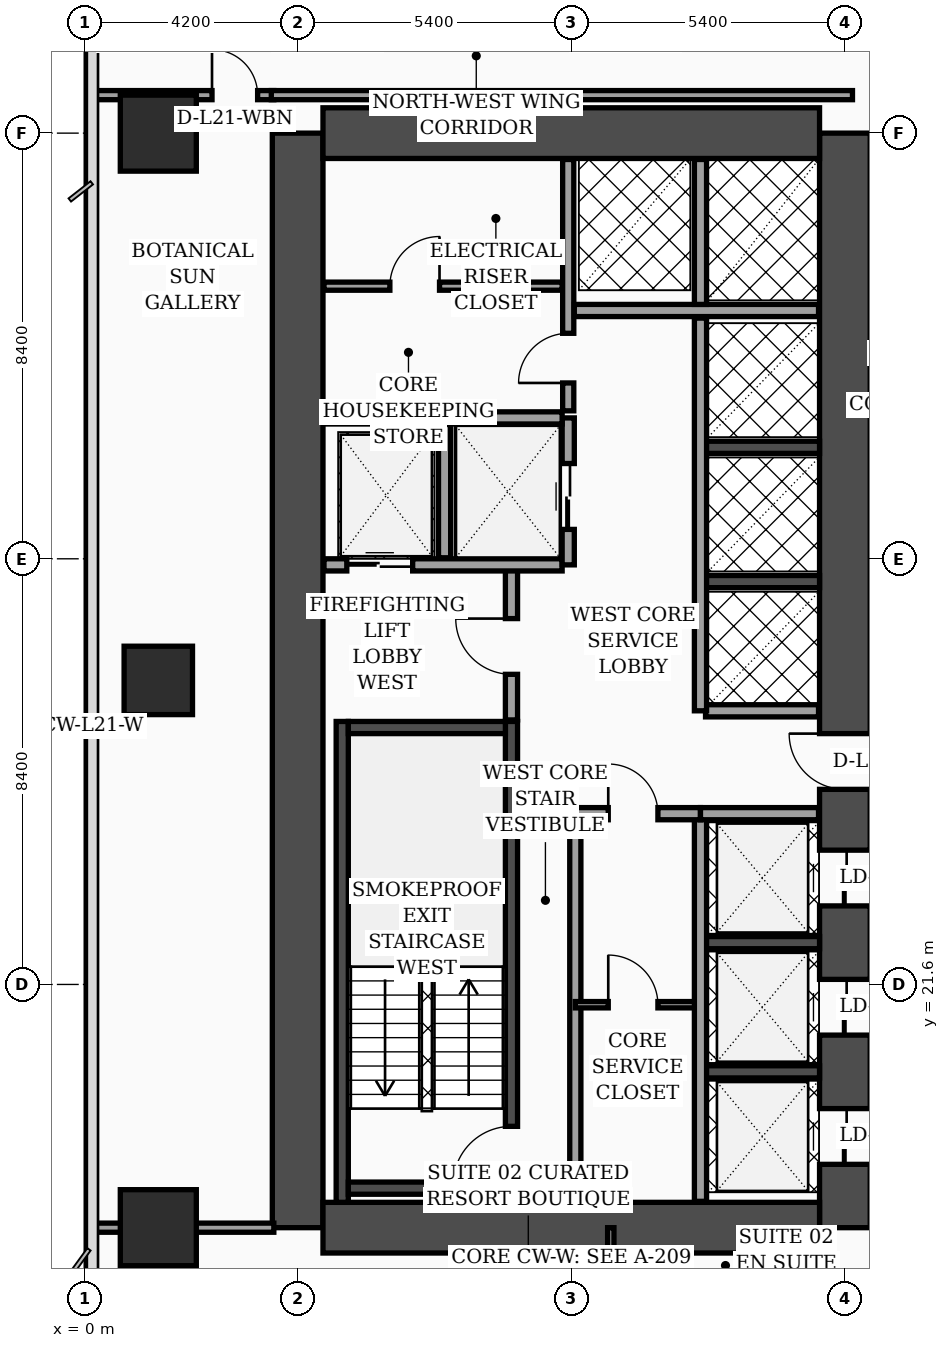
"""IFC4 building model, lengths in metres.
Left out: names, types, materials, properties, quantities, classifications, styles, units other than length and angle.
Written with IfcOpenShell. Run it as: python <this file> out.ifc"""

import sys

from ifc_helpers import new_model, si_unit, direction, frame, frame_2d, origin, origin_2d, place, context, subcontext, project, spatial, rectangle, extrude, element, fill, save


model = new_model("IFC4")
c1 = context("Model", 3, precision=1e-05, world=origin(), true_north=direction((0.0, 1.0)))
c2 = subcontext(c1, "Body", "Model", "MODEL_VIEW")
j1 = project(units=[si_unit("LENGTHUNIT", "METRE"), si_unit("PLANEANGLEUNIT", "RADIAN")], contexts=[c1])
p1 = place(None, origin())
s1 = spatial("IfcSite", under=j1, at=p1, CompositionType="ELEMENT")
p2 = place(p1, origin())
s2 = spatial("IfcBuilding", under=s1, at=p2, CompositionType="ELEMENT")
p3 = place(p2, frame((0.0, 0.0, 88.8)))
s3 = spatial("IfcBuildingStorey", under=s2, at=p3, CompositionType="ELEMENT", Elevation=88.8)
p4 = place(p3, frame((4.2, 16.8, 0.0), z_axis=(0.0, 0.0, 1.0), x_axis=(0.0, 1.0, 0.0)))
e1 = element("IfcWall", 1, at=p4, inside=s3, PredefinedType="SHEAR", context=c2, shape_type="SweptSolid", body=[
    extrude(rectangle(XDim=21.6, YDim=1.0, at=frame_2d((10.8, 0.0))), origin(), (0.0, 0.0, 1.0), 3.52),
])
p5 = place(p3, frame((15.0, 16.8, 0.0), z_axis=(0.0, 0.0, 1.0), x_axis=(0.0, 1.0, 0.0)))
e2 = element("IfcWall", 2, at=p5, inside=s3, PredefinedType="SHEAR", context=c2, shape_type="SweptSolid", body=[
    extrude(rectangle(XDim=21.6, YDim=1.0, at=frame_2d((10.8, 0.0))), origin(), (0.0, 0.0, 1.0), 3.52),
])
p6 = place(p5, frame((8.65, 0.0, 0.0)))
e3 = element("IfcOpeningElement", 3, at=p6, cuts=e2, PredefinedType="OPENING", context=c2, shape_type="SweptSolid", body=[
    extrude(rectangle(XDim=1.1, YDim=2.2, at=frame_2d((0.55, 1.1))), frame((0.0, 0.51, 0.0), z_axis=(0.0, -1.0, 0.0), x_axis=(1.0, 0.0, 0.0)), (0.0, 0.0, 1.0), 1.02),
])
p7 = place(p5, frame((1.25, 0.0, 0.0)))
e4 = element("IfcOpeningElement", 4, at=p7, cuts=e2, PredefinedType="OPENING", context=c2, shape_type="SweptSolid", body=[
    extrude(rectangle(XDim=1.1, YDim=2.2, at=frame_2d((0.55, 1.1))), frame((0.0, 0.51, 0.0), z_axis=(0.0, -1.0, 0.0), x_axis=(1.0, 0.0, 0.0)), (0.0, 0.0, 1.0), 1.02),
])
p8 = place(p5, frame((3.8, 0.0, 0.0)))
e5 = element("IfcOpeningElement", 5, at=p8, cuts=e2, PredefinedType="OPENING", context=c2, shape_type="SweptSolid", body=[
    extrude(rectangle(XDim=1.1, YDim=2.2, at=frame_2d((0.55, 1.1))), frame((0.0, 0.51, 0.0), z_axis=(0.0, -1.0, 0.0), x_axis=(1.0, 0.0, 0.0)), (0.0, 0.0, 1.0), 1.02),
])
p9 = place(p5, frame((6.35, 0.0, 0.0)))
e6 = element("IfcOpeningElement", 6, at=p9, cuts=e2, PredefinedType="OPENING", context=c2, shape_type="SweptSolid", body=[
    extrude(rectangle(XDim=1.1, YDim=2.2, at=frame_2d((0.55, 1.1))), frame((0.0, 0.51, 0.0), z_axis=(0.0, -1.0, 0.0), x_axis=(1.0, 0.0, 0.0)), (0.0, 0.0, 1.0), 1.02),
])
for number, where, z_axis, x_axis in (
    (7, (4.7, 38.4, 0.0), (0.0, 0.0, 1.0), (1.0, 0.0, 0.0)),
    (8, (4.7, 16.8, 0.0), (0.0, 0.0, 1.0), (1.0, 0.0, 0.0)),
):
    element("IfcWall", number, at=place(p3, frame(where, z_axis=z_axis, x_axis=x_axis)), inside=s3, PredefinedType="SHEAR", context=c2, shape_type="SweptSolid", body=[
        extrude(rectangle(XDim=9.8, YDim=1.0, at=frame_2d((4.9, 0.0))), origin(), (0.0, 0.0, 1.0), 3.52),
    ])
p10 = place(p3, frame((5.08, 17.3, 0.0), z_axis=(0.0, 0.0, 1.0), x_axis=(0.0, 1.0, 0.0)))
e9 = element("IfcWall", 9, at=p10, inside=s3, PredefinedType="SOLIDWALL", context=c2, shape_type="SweptSolid", body=[
    extrude(rectangle(XDim=9.49, YDim=0.24, at=frame_2d((4.745, 0.0))), origin(), (0.0, 0.0, 1.0), 3.52),
])
p11 = place(p3, frame((8.42, 17.3, 0.0), z_axis=(0.0, 0.0, 1.0), x_axis=(0.0, 1.0, 0.0)))
e10 = element("IfcWall", 10, at=p11, inside=s3, PredefinedType="SOLIDWALL", context=c2, shape_type="SweptSolid", body=[
    extrude(rectangle(XDim=9.49, YDim=0.24, at=frame_2d((4.745, 0.0))), origin(), (0.0, 0.0, 1.0), 3.52),
])
p12 = place(p11, frame((0.35, 0.0, 0.0)))
e11 = element("IfcOpeningElement", 11, at=p12, cuts=e10, PredefinedType="OPENING", context=c2, shape_type="SweptSolid", body=[
    extrude(rectangle(XDim=1.15, YDim=2.2, at=frame_2d((0.575, 1.1))), frame((0.0, 0.13, 0.0), z_axis=(0.0, -1.0, 0.0), x_axis=(1.0, 0.0, 0.0)), (0.0, 0.0, 1.0), 0.26),
])
for number, where, z_axis, x_axis in (
    (12, (5.2, 17.58, 0.0), (0.0, 0.0, 1.0), (1.0, 0.0, 0.0)),
    (13, (5.2, 26.67, 0.0), (0.0, 0.0, 1.0), (1.0, 0.0, 0.0)),
):
    element("IfcWall", number, at=place(p3, frame(where, z_axis=z_axis, x_axis=x_axis)), inside=s3, PredefinedType="SOLIDWALL", context=c2, shape_type="SweptSolid", body=[
        extrude(rectangle(XDim=3.1, YDim=0.24, at=frame_2d((1.55, 0.0))), origin(), (0.0, 0.0, 1.0), 3.52),
    ])
for number, where, z_axis, x_axis in (
    (14, (12.18, 19.875, 0.0), (0.0, 0.0, 1.0), (1.0, 0.0, 0.0)),
    (15, (12.18, 22.425, 0.0), (0.0, 0.0, 1.0), (1.0, 0.0, 0.0)),
    (16, (12.18, 29.55, 0.0), (0.0, 0.0, 1.0), (1.0, 0.0, 0.0)),
    (17, (12.18, 32.2, 0.0), (0.0, 0.0, 1.0), (1.0, 0.0, 0.0)),
):
    element("IfcWall", number, at=place(p3, frame(where, z_axis=z_axis, x_axis=x_axis)), inside=s3, PredefinedType="SOLIDWALL", context=c2, shape_type="SweptSolid", body=[
        extrude(rectangle(XDim=2.32, YDim=0.24, at=frame_2d((1.16, 0.0))), origin(), (0.0, 0.0, 1.0), 3.52),
    ])
p13 = place(p3, frame((1.45, 16.8, 0.0), z_axis=(0.0, 0.0, 1.0), x_axis=(1.0, 0.0, 0.0)))
e18 = element("IfcColumn", 18, at=p13, inside=s3, PredefinedType="COLUMN", context=c2, shape_type="SweptSolid", body=[
    extrude(rectangle(XDim=1.5, YDim=1.5, at=origin_2d()), origin(), (0.0, 0.0, 1.0), 3.52),
])
p14 = place(p3, frame((1.45, 27.6, 0.0), z_axis=(0.0, 0.0, 1.0), x_axis=(1.0, 0.0, 0.0)))
e19 = element("IfcColumn", 19, at=p14, inside=s3, PredefinedType="COLUMN", context=c2, shape_type="SweptSolid", body=[
    extrude(rectangle(XDim=1.35, YDim=1.35, at=origin_2d()), origin(), (0.0, 0.0, 1.0), 3.52),
])
p15 = place(p3, frame((1.45, 38.4, 0.0), z_axis=(0.0, 0.0, 1.0), x_axis=(1.0, 0.0, 0.0)))
e20 = element("IfcColumn", 20, at=p15, inside=s3, PredefinedType="COLUMN", context=c2, shape_type="SweptSolid", body=[
    extrude(rectangle(XDim=1.5, YDim=1.5, at=origin_2d()), origin(), (0.0, 0.0, 1.0), 3.52),
])
p16 = place(p3, frame((8.42, 26.82, 0.0), z_axis=(0.0, 0.0, 1.0), x_axis=(0.0, 1.0, 0.0)))
e21 = element("IfcWall", 21, at=p16, inside=s3, PredefinedType="SOLIDWALL", context=c2, shape_type="SweptSolid", body=[
    extrude(rectangle(XDim=3.0, YDim=0.24, at=frame_2d((1.5, 0.0))), origin(), (0.0, 0.0, 1.0), 3.52),
])
p17 = place(p16, frame((0.9, 0.0, 0.0)))
e22 = element("IfcOpeningElement", 22, at=p17, cuts=e21, PredefinedType="OPENING", context=c2, shape_type="SweptSolid", body=[
    extrude(rectangle(XDim=1.1, YDim=2.2, at=frame_2d((0.55, 1.1))), frame((0.0, 0.13, 0.0), z_axis=(0.0, -1.0, 0.0), x_axis=(1.0, 0.0, 0.0)), (0.0, 0.0, 1.0), 0.26),
])
p18 = place(p3, frame((4.72, 29.88, 0.0), z_axis=(0.0, 0.0, 1.0), x_axis=(1.0, 0.0, 0.0)))
e23 = element("IfcWall", 23, at=p18, inside=s3, PredefinedType="SOLIDWALL", context=c2, shape_type="SweptSolid", body=[
    extrude(rectangle(XDim=4.7, YDim=0.24, at=frame_2d((2.35, 0.0))), origin(), (0.0, 0.0, 1.0), 3.52),
])
p19 = place(p18, frame((0.45, 0.0, 0.0)))
e24 = element("IfcOpeningElement", 24, at=p19, cuts=e23, PredefinedType="OPENING", context=c2, shape_type="SweptSolid", body=[
    extrude(rectangle(XDim=1.3, YDim=2.35, at=frame_2d((0.65, 1.175))), frame((0.0, 0.13, 0.0), z_axis=(0.0, -1.0, 0.0), x_axis=(1.0, 0.0, 0.0)), (0.0, 0.0, 1.0), 0.26),
])
p20 = place(p3, frame((7.1, 30.02, 0.0), z_axis=(0.0, 0.0, 1.0), x_axis=(0.0, 1.0, 0.0)))
e25 = element("IfcWall", 25, at=p20, inside=s3, PredefinedType="SOLIDWALL", context=c2, shape_type="SweptSolid", body=[
    extrude(rectangle(XDim=2.63, YDim=0.24, at=frame_2d((1.315, 0.0))), origin(), (0.0, 0.0, 1.0), 3.52),
])
p21 = place(p3, frame((9.54, 29.88, 0.0), z_axis=(0.0, 0.0, 1.0), x_axis=(0.0, 1.0, 0.0)))
e26 = element("IfcWall", 26, at=p21, inside=s3, PredefinedType="SOLIDWALL", context=c2, shape_type="SweptSolid", body=[
    extrude(rectangle(XDim=2.9, YDim=0.24, at=frame_2d((1.45, 0.0))), origin(), (0.0, 0.0, 1.0), 3.52),
])
p22 = place(p21, frame((0.7, 0.0, 0.0)))
e27 = element("IfcOpeningElement", 27, at=p22, cuts=e26, PredefinedType="OPENING", context=c2, shape_type="SweptSolid", body=[
    extrude(rectangle(XDim=1.3, YDim=2.35, at=frame_2d((0.65, 1.175))), frame((0.0, 0.13, 0.0), z_axis=(0.0, -1.0, 0.0), x_axis=(1.0, 0.0, 0.0)), (0.0, 0.0, 1.0), 0.26),
])
p23 = place(p3, frame((4.72, 32.78, 0.0), z_axis=(0.0, 0.0, 1.0), x_axis=(1.0, 0.0, 0.0)))
e28 = element("IfcWall", 28, at=p23, inside=s3, PredefinedType="SOLIDWALL", context=c2, shape_type="SweptSolid", body=[
    extrude(rectangle(XDim=4.7, YDim=0.24, at=frame_2d((2.35, 0.0))), origin(), (0.0, 0.0, 1.0), 3.52),
])
p24 = place(p3, frame((9.68, 17.32, 0.0), z_axis=(0.0, 0.0, 1.0), x_axis=(0.0, 1.0, 0.0)))
e29 = element("IfcWall", 29, at=p24, inside=s3, PredefinedType="SOLIDWALL", context=c2, shape_type="SweptSolid", body=[
    extrude(rectangle(XDim=7.68, YDim=0.22, at=frame_2d((3.84, 0.0))), origin(), (0.0, 0.0, 1.0), 3.52),
])
p25 = place(p3, frame((4.72, 35.38, 0.0), z_axis=(0.0, 0.0, 1.0), x_axis=(1.0, 0.0, 0.0)))
e30 = element("IfcWall", 30, at=p25, inside=s3, PredefinedType="PARTITIONING", context=c2, shape_type="SweptSolid", body=[
    extrude(rectangle(XDim=4.7, YDim=0.16, at=frame_2d((2.35, 0.0))), origin(), (0.0, 0.0, 1.0), 3.52),
])
p26 = place(p25, frame((1.3, 0.0, 0.0)))
e31 = element("IfcOpeningElement", 31, at=p26, cuts=e30, PredefinedType="OPENING", context=c2, shape_type="SweptSolid", body=[
    extrude(rectangle(XDim=0.98, YDim=2.15, at=frame_2d((0.49, 1.075))), frame((0.0, 0.09, 0.0), z_axis=(0.0, -1.0, 0.0), x_axis=(1.0, 0.0, 0.0)), (0.0, 0.0, 1.0), 0.18),
])
p27 = place(p3, frame((9.54, 32.92, 0.0), z_axis=(0.0, 0.0, 1.0), x_axis=(0.0, 1.0, 0.0)))
e32 = element("IfcWall", 32, at=p27, inside=s3, PredefinedType="SOLIDWALL", context=c2, shape_type="SweptSolid", body=[
    extrude(rectangle(XDim=4.96, YDim=0.22, at=frame_2d((2.48, 0.0))), origin(), (0.0, 0.0, 1.0), 3.52),
])
p28 = place(p27, frame((0.55, 0.0, 0.0)))
e33 = element("IfcOpeningElement", 33, at=p28, cuts=e32, PredefinedType="OPENING", context=c2, shape_type="SweptSolid", body=[
    extrude(rectangle(XDim=0.98, YDim=2.15, at=frame_2d((0.49, 1.075))), frame((0.0, 0.12, 0.0), z_axis=(0.0, -1.0, 0.0), x_axis=(1.0, 0.0, 0.0)), (0.0, 0.0, 1.0), 0.24),
])
p29 = place(p3, frame((9.68, 21.2, 0.0), z_axis=(0.0, 0.0, 1.0), x_axis=(1.0, 0.0, 0.0)))
e34 = element("IfcWall", 34, at=p29, inside=s3, PredefinedType="PARTITIONING", context=c2, shape_type="SweptSolid", body=[
    extrude(rectangle(XDim=2.47, YDim=0.125, at=frame_2d((1.235, 0.0))), origin(), (0.0, 0.0, 1.0), 3.52),
])
p30 = place(p29, frame((0.65, 0.0, 0.0)))
e35 = element("IfcOpeningElement", 35, at=p30, cuts=e34, PredefinedType="OPENING", context=c2, shape_type="SweptSolid", body=[
    extrude(rectangle(XDim=0.98, YDim=2.15, at=frame_2d((0.49, 1.075))), frame((0.0, 0.073, 0.0), z_axis=(0.0, -1.0, 0.0), x_axis=(1.0, 0.0, 0.0)), (0.0, 0.0, 1.0), 0.145),
])
p31 = place(p3, frame((12.15, 17.32, 0.0), z_axis=(0.0, 0.0, 1.0), x_axis=(0.0, 1.0, 0.0)))
e36 = element("IfcWall", 36, at=p31, inside=s3, PredefinedType="SOLIDWALL", context=c2, shape_type="SweptSolid", body=[
    extrude(rectangle(XDim=7.65, YDim=0.24, at=frame_2d((3.825, 0.0))), origin(), (0.0, 0.0, 1.0), 3.52),
])
p32 = place(p3, frame((9.68, 24.97, 0.0), z_axis=(0.0, 0.0, 1.0), x_axis=(1.0, 0.0, 0.0)))
e37 = element("IfcWall", 37, at=p32, inside=s3, PredefinedType="SOLIDWALL", context=c2, shape_type="SweptSolid", body=[
    extrude(rectangle(XDim=2.47, YDim=0.24, at=frame_2d((1.235, 0.0))), origin(), (0.0, 0.0, 1.0), 3.52),
])
p33 = place(p32, frame((0.65, 0.0, 0.0)))
e38 = element("IfcOpeningElement", 38, at=p33, cuts=e37, PredefinedType="OPENING", context=c2, shape_type="SweptSolid", body=[
    extrude(rectangle(XDim=0.98, YDim=2.15, at=frame_2d((0.49, 1.075))), frame((0.0, 0.13, 0.0), z_axis=(0.0, -1.0, 0.0), x_axis=(1.0, 0.0, 0.0)), (0.0, 0.0, 1.0), 0.26),
])
p34 = place(p3, frame((12.15, 24.97, 0.0), z_axis=(0.0, 0.0, 1.0), x_axis=(1.0, 0.0, 0.0)))
e39 = element("IfcWall", 39, at=p34, inside=s3, PredefinedType="SOLIDWALL", context=c2, shape_type="SweptSolid", body=[
    extrude(rectangle(XDim=2.33, YDim=0.24, at=frame_2d((1.165, 0.0))), origin(), (0.0, 0.0, 1.0), 2.82),
])
p35 = place(p3, frame((12.25, 27.0, 0.0), z_axis=(0.0, 0.0, 1.0), x_axis=(1.0, 0.0, 0.0)))
e40 = element("IfcWall", 40, at=p35, inside=s3, PredefinedType="SOLIDWALL", context=c2, shape_type="SweptSolid", body=[
    extrude(rectangle(XDim=2.23, YDim=0.24, at=frame_2d((1.115, 0.0))), origin(), (0.0, 0.0, 1.0), 3.52),
])
p36 = place(p3, frame((12.15, 27.0, 0.0), z_axis=(0.0, 0.0, 1.0), x_axis=(0.0, 1.0, 0.0)))
e41 = element("IfcWall", 41, at=p36, inside=s3, PredefinedType="SOLIDWALL", context=c2, shape_type="SweptSolid", body=[
    extrude(rectangle(XDim=7.75, YDim=0.24, at=frame_2d((3.875, 0.0))), origin(), (0.0, 0.0, 1.0), 3.52),
])
p37 = place(p3, frame((9.66, 34.9, 0.0), z_axis=(0.0, 0.0, 1.0), x_axis=(1.0, 0.0, 0.0)))
e42 = element("IfcWall", 42, at=p37, inside=s3, PredefinedType="SOLIDWALL", context=c2, shape_type="SweptSolid", body=[
    extrude(rectangle(XDim=4.82, YDim=0.24, at=frame_2d((2.41, 0.0))), origin(), (0.0, 0.0, 1.0), 3.52),
])
p38 = place(p3, frame((12.15, 35.02, 0.0), z_axis=(0.0, 0.0, 1.0), x_axis=(0.0, 1.0, 0.0)))
e43 = element("IfcWall", 43, at=p38, inside=s3, PredefinedType="SOLIDWALL", context=c2, shape_type="SweptSolid", body=[
    extrude(rectangle(XDim=2.86, YDim=0.24, at=frame_2d((1.43, 0.0))), origin(), (0.0, 0.0, 1.0), 3.52),
])
p39 = place(p3, frame((0.08, 16.8, 0.0), z_axis=(0.0, 0.0, 1.0), x_axis=(1.0, 0.0, 0.0)))
e44 = element("IfcWall", 44, at=p39, inside=s3, PredefinedType="PARTITIONING", context=c2, shape_type="SweptSolid", body=[
    extrude(rectangle(XDim=3.65, YDim=0.18, at=frame_2d((1.825, 0.0))), origin(), (0.0, 0.0, 1.0), 2.82),
])
p40 = place(p3, frame((0.08, 39.15, 0.0), z_axis=(0.0, 0.0, 1.0), x_axis=(1.0, 0.0, 0.0)))
e45 = element("IfcWall", 45, at=p40, inside=s3, PredefinedType="PARTITIONING", context=c2, shape_type="SweptSolid", body=[
    extrude(rectangle(XDim=3.65, YDim=0.18, at=frame_2d((1.825, 0.0))), origin(), (0.0, 0.0, 1.0), 2.82),
])
p41 = place(p40, frame((2.43, 0.0, 0.0)))
e46 = element("IfcOpeningElement", 46, at=p41, cuts=e45, PredefinedType="OPENING", context=c2, shape_type="SweptSolid", body=[
    extrude(rectangle(XDim=0.9, YDim=2.15, at=frame_2d((0.45, 1.075))), frame((0.0, 0.1, 0.0), z_axis=(0.0, -1.0, 0.0), x_axis=(1.0, 0.0, 0.0)), (0.0, 0.0, 1.0), 0.2),
])
p42 = place(p3, frame((10.38, 14.67, 0.0), z_axis=(0.0, 0.0, 1.0), x_axis=(0.0, 1.0, 0.0)))
e47 = element("IfcWall", 47, at=p42, inside=s3, PredefinedType="PARTITIONING", context=c2, shape_type="SweptSolid", body=[
    extrude(rectangle(XDim=2.13, YDim=0.125, at=frame_2d((1.065, 0.0))), origin(), (0.0, 0.0, 1.0), 3.52),
])
p43 = place(p3, frame((13.3, 2.44, 0.0), z_axis=(0.0, 0.0, 1.0), x_axis=(0.0, 1.0, 0.0)))
e48 = element("IfcWall", 48, at=p43, inside=s3, PredefinedType="PARTITIONING", context=c2, shape_type="SweptSolid", body=[
    extrude(rectangle(XDim=14.36, YDim=0.18, at=frame_2d((7.18, 0.0))), origin(), (0.0, 0.0, 1.0), 3.02),
])
p44 = place(p43, frame((3.01, 0.0, 0.0)))
e49 = element("IfcOpeningElement", 49, at=p44, cuts=e48, PredefinedType="OPENING", context=c2, shape_type="SweptSolid", body=[
    extrude(rectangle(XDim=1.02, YDim=2.2, at=frame_2d((0.51, 1.1))), frame((0.0, 0.1, 0.0), z_axis=(0.0, -1.0, 0.0), x_axis=(1.0, 0.0, 0.0)), (0.0, 0.0, 1.0), 0.2),
])
p45 = place(p43, frame((8.94, 0.0, 0.0)))
e50 = element("IfcOpeningElement", 50, at=p45, cuts=e48, PredefinedType="OPENING", context=c2, shape_type="SweptSolid", body=[
    extrude(rectangle(XDim=1.02, YDim=2.2, at=frame_2d((0.51, 1.1))), frame((0.0, 0.1, 0.0), z_axis=(0.0, -1.0, 0.0), x_axis=(1.0, 0.0, 0.0)), (0.0, 0.0, 1.0), 0.2),
])
p46 = place(p3, frame((3.68, 39.15, 0.0), z_axis=(0.0, 0.0, 1.0), x_axis=(1.0, 0.0, 0.0)))
e51 = element("IfcWall", 51, at=p46, inside=s3, PredefinedType="PARTITIONING", context=c2, shape_type="SweptSolid", body=[
    extrude(rectangle(XDim=11.47, YDim=0.18, at=frame_2d((5.735, 0.0))), origin(), (0.0, 0.0, 1.0), 2.82),
])
p47 = place(p17, origin())
e52 = element("IfcDoor", 52, at=p47, inside=s3, OperationType="SINGLE_SWING_RIGHT", PredefinedType="DOOR", context=c2, shape_type="SweptSolid", body=[
    extrude(rectangle(XDim=1.1, YDim=2.2, at=frame_2d((0.55, 1.1))), frame((0.0, 0.025, 0.0), z_axis=(0.0, -1.0, 0.0), x_axis=(1.0, 0.0, 0.0)), (0.0, 0.0, 1.0), 0.05),
])
fill(e22, e52)
p48 = place(p19, origin())
e53 = element("IfcDoor", 53, at=p48, inside=s3, OperationType="DOUBLE_DOOR_SLIDING", PredefinedType="DOOR", context=c2, shape_type="SweptSolid", body=[
    extrude(rectangle(XDim=1.3, YDim=2.35, at=frame_2d((0.65, 1.175))), frame((0.0, 0.025, 0.0), z_axis=(0.0, -1.0, 0.0), x_axis=(1.0, 0.0, 0.0)), (0.0, 0.0, 1.0), 0.05),
])
fill(e24, e53)
p49 = place(p22, origin())
e54 = element("IfcDoor", 54, at=p49, inside=s3, OperationType="DOUBLE_DOOR_SLIDING", PredefinedType="DOOR", context=c2, shape_type="SweptSolid", body=[
    extrude(rectangle(XDim=1.3, YDim=2.35, at=frame_2d((0.65, 1.175))), frame((0.0, 0.025, 0.0), z_axis=(0.0, -1.0, 0.0), x_axis=(1.0, 0.0, 0.0)), (0.0, 0.0, 1.0), 0.05),
])
fill(e27, e54)
p50 = place(p26, origin())
e55 = element("IfcDoor", 55, at=p50, inside=s3, OperationType="SINGLE_SWING_RIGHT", PredefinedType="DOOR", context=c2, shape_type="SweptSolid", body=[
    extrude(rectangle(XDim=0.98, YDim=2.15, at=frame_2d((0.49, 1.075))), frame((0.0, 0.025, 0.0), z_axis=(0.0, -1.0, 0.0), x_axis=(1.0, 0.0, 0.0)), (0.0, 0.0, 1.0), 0.05),
])
fill(e31, e55)
p51 = place(p28, origin())
e56 = element("IfcDoor", 56, at=p51, inside=s3, OperationType="SINGLE_SWING_LEFT", PredefinedType="DOOR", context=c2, shape_type="SweptSolid", body=[
    extrude(rectangle(XDim=0.98, YDim=2.15, at=frame_2d((0.49, 1.075))), frame((0.0, 0.025, 0.0), z_axis=(0.0, -1.0, 0.0), x_axis=(1.0, 0.0, 0.0)), (0.0, 0.0, 1.0), 0.05),
])
fill(e33, e56)
p52 = place(p30, origin())
e57 = element("IfcDoor", 57, at=p52, inside=s3, OperationType="SINGLE_SWING_LEFT", PredefinedType="DOOR", context=c2, shape_type="SweptSolid", body=[
    extrude(rectangle(XDim=0.98, YDim=2.15, at=frame_2d((0.49, 1.075))), frame((0.0, 0.025, 0.0), z_axis=(0.0, -1.0, 0.0), x_axis=(1.0, 0.0, 0.0)), (0.0, 0.0, 1.0), 0.05),
])
fill(e35, e57)
p53 = place(p33, origin())
e58 = element("IfcDoor", 58, at=p53, inside=s3, OperationType="SINGLE_SWING_LEFT", PredefinedType="DOOR", context=c2, shape_type="SweptSolid", body=[
    extrude(rectangle(XDim=0.98, YDim=2.15, at=frame_2d((0.49, 1.075))), frame((0.0, 0.025, 0.0), z_axis=(0.0, -1.0, 0.0), x_axis=(1.0, 0.0, 0.0)), (0.0, 0.0, 1.0), 0.05),
])
fill(e38, e58)
p54 = place(p41, origin())
e59 = element("IfcDoor", 59, at=p54, inside=s3, OperationType="SINGLE_SWING_LEFT", PredefinedType="DOOR", context=c2, shape_type="SweptSolid", body=[
    extrude(rectangle(XDim=0.9, YDim=2.15, at=frame_2d((0.45, 1.075))), frame((0.0, 0.025, 0.0), z_axis=(0.0, -1.0, 0.0), x_axis=(1.0, 0.0, 0.0)), (0.0, 0.0, 1.0), 0.05),
])
fill(e46, e59)
p55 = place(p12, origin())
e60 = element("IfcDoor", 60, at=p55, inside=s3, OperationType="SINGLE_SWING_LEFT", PredefinedType="DOOR", context=c2, shape_type="SweptSolid", body=[
    extrude(rectangle(XDim=1.15, YDim=2.2, at=frame_2d((0.575, 1.1))), frame((0.0, 0.025, 0.0), z_axis=(0.0, -1.0, 0.0), x_axis=(1.0, 0.0, 0.0)), (0.0, 0.0, 1.0), 0.05),
])
fill(e11, e60)
p56 = place(p6, origin())
e61 = element("IfcDoor", 61, at=p56, inside=s3, OperationType="SINGLE_SWING_RIGHT", PredefinedType="DOOR", context=c2, shape_type="SweptSolid", body=[
    extrude(rectangle(XDim=1.1, YDim=2.2, at=frame_2d((0.55, 1.1))), frame((0.0, 0.025, 0.0), z_axis=(0.0, -1.0, 0.0), x_axis=(1.0, 0.0, 0.0)), (0.0, 0.0, 1.0), 0.05),
])
fill(e3, e61)
p57 = place(p7, origin())
e62 = element("IfcDoor", 62, at=p57, inside=s3, OperationType="DOUBLE_DOOR_SLIDING", PredefinedType="DOOR", context=c2, shape_type="SweptSolid", body=[
    extrude(rectangle(XDim=1.1, YDim=2.2, at=frame_2d((0.55, 1.1))), frame((0.0, 0.025, 0.0), z_axis=(0.0, -1.0, 0.0), x_axis=(1.0, 0.0, 0.0)), (0.0, 0.0, 1.0), 0.05),
])
fill(e4, e62)
p58 = place(p8, origin())
e63 = element("IfcDoor", 63, at=p58, inside=s3, OperationType="DOUBLE_DOOR_SLIDING", PredefinedType="DOOR", context=c2, shape_type="SweptSolid", body=[
    extrude(rectangle(XDim=1.1, YDim=2.2, at=frame_2d((0.55, 1.1))), frame((0.0, 0.025, 0.0), z_axis=(0.0, -1.0, 0.0), x_axis=(1.0, 0.0, 0.0)), (0.0, 0.0, 1.0), 0.05),
])
fill(e5, e63)
p59 = place(p9, origin())
e64 = element("IfcDoor", 64, at=p59, inside=s3, OperationType="DOUBLE_DOOR_SLIDING", PredefinedType="DOOR", context=c2, shape_type="SweptSolid", body=[
    extrude(rectangle(XDim=1.1, YDim=2.2, at=frame_2d((0.55, 1.1))), frame((0.0, 0.025, 0.0), z_axis=(0.0, -1.0, 0.0), x_axis=(1.0, 0.0, 0.0)), (0.0, 0.0, 1.0), 0.05),
])
fill(e6, e64)
save(model, sys.argv[1])
